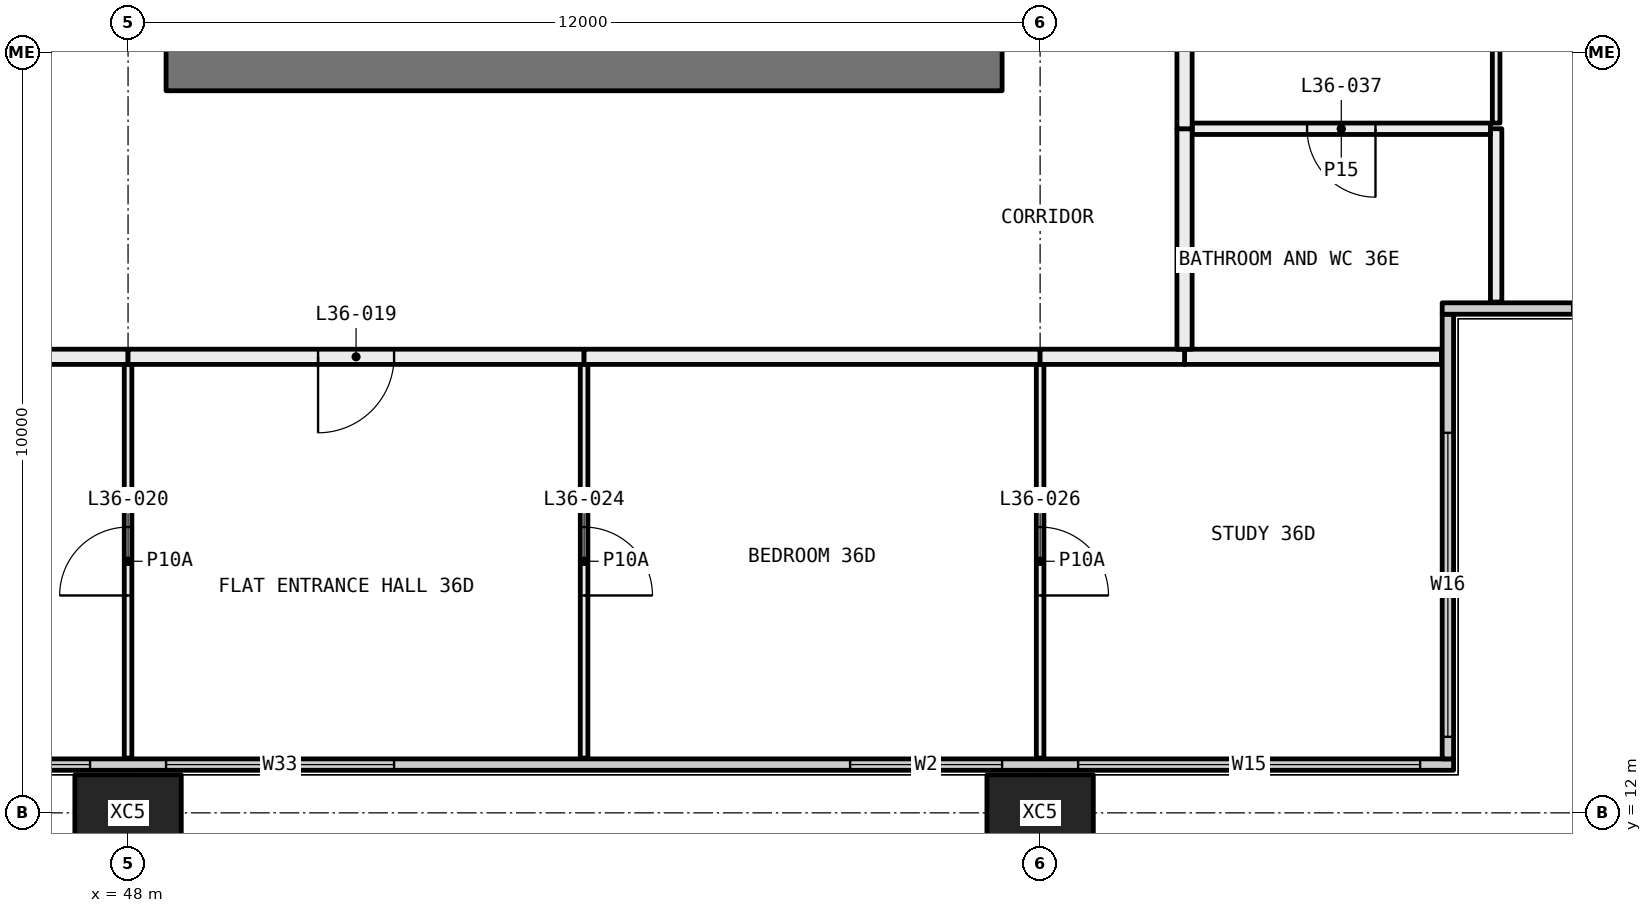
"""IFC4 building model, lengths in metres.
Left out: names, types, materials, properties, quantities, classifications, styles, units other than length and angle.
Written with IfcOpenShell. Run it as: python <this file> out.ifc"""

import sys

from ifc_helpers import new_model, si_unit, direction, frame, frame_2d, origin, origin_2d, place, context, subcontext, project, spatial, rectangle, hollow_rectangle, extrude, element, fill, save


model = new_model("IFC4")
c1 = context("Model", 3, precision=1e-05, world=origin(), true_north=direction((0.0, 1.0)))
c2 = subcontext(c1, "Body", "Model", "MODEL_VIEW")
j1 = project(units=[si_unit("LENGTHUNIT", "METRE"), si_unit("PLANEANGLEUNIT", "RADIAN")], contexts=[c1])
p1 = place(None, origin())
s1 = spatial("IfcSite", under=j1, at=p1, CompositionType="ELEMENT")
p2 = place(p1, origin())
s2 = spatial("IfcBuilding", under=s1, at=p2, CompositionType="ELEMENT")
p3 = place(p2, frame((0.0, 0.0, 138.0)))
s3 = spatial("IfcBuildingStorey", under=s2, at=p3, CompositionType="ELEMENT", Elevation=138.0)
for number, where, z_axis, x_axis in (
    (1, (48.0, 12.0, -0.4), (0.0, 0.0, 1.0), (1.0, 0.0, 0.0)),
    (2, (60.0, 12.0, -0.4), (0.0, 0.0, 1.0), (1.0, 0.0, 0.0)),
):
    element("IfcColumn", number, at=place(p3, frame(where, z_axis=z_axis, x_axis=x_axis)), inside=s3, PredefinedType="COLUMN", context=c2, shape_type="SweptSolid", body=[
        extrude(hollow_rectangle(XDim=1.4, YDim=1.0, WallThickness=0.055, at=origin_2d()), origin(), (0.0, 0.0, 1.0), 3.45),
    ])
p4 = place(p3, frame((6.56, 12.635, 0.0), z_axis=(0.0, 0.0, 1.0), x_axis=(1.0, 0.0, 0.0)))
e3 = element("IfcWall", 3, at=p4, inside=s3, PredefinedType="ELEMENTEDWALL", context=c2, shape_type="SweptSolid", body=[
    extrude(rectangle(XDim=58.88, YDim=0.15, at=frame_2d((29.44, 0.0))), origin(), (0.0, 0.0, 1.0), 3.05),
])
p5 = place(p4, frame((0.44, 0.0, 0.45)))
e4 = element("IfcOpeningElement", 4, at=p5, cuts=e3, PredefinedType="OPENING", context=c2, shape_type="SweptSolid", body=[
    extrude(rectangle(XDim=4.5, YDim=2.55, at=frame_2d((2.25, 1.275))), frame((0.0, 0.085, 0.0), z_axis=(0.0, -1.0, 0.0), x_axis=(1.0, 0.0, 0.0)), (0.0, 0.0, 1.0), 0.17),
])
p6 = place(p4, frame((5.94, 0.0, 0.45)))
e5 = element("IfcOpeningElement", 5, at=p6, cuts=e3, PredefinedType="OPENING", context=c2, shape_type="SweptSolid", body=[
    extrude(rectangle(XDim=3.0, YDim=2.55, at=frame_2d((1.5, 1.275))), frame((0.0, 0.085, 0.0), z_axis=(0.0, -1.0, 0.0), x_axis=(1.0, 0.0, 0.0)), (0.0, 0.0, 1.0), 0.17),
])
p7 = place(p4, frame((13.94, 0.0, 0.45)))
e6 = element("IfcOpeningElement", 6, at=p7, cuts=e3, PredefinedType="OPENING", context=c2, shape_type="SweptSolid", body=[
    extrude(rectangle(XDim=3.0, YDim=2.55, at=frame_2d((1.5, 1.275))), frame((0.0, 0.085, 0.0), z_axis=(0.0, -1.0, 0.0), x_axis=(1.0, 0.0, 0.0)), (0.0, 0.0, 1.0), 0.17),
])
p8 = place(p4, frame((17.94, 0.0, 0.45)))
e7 = element("IfcOpeningElement", 7, at=p8, cuts=e3, PredefinedType="OPENING", context=c2, shape_type="SweptSolid", body=[
    extrude(rectangle(XDim=3.0, YDim=2.55, at=frame_2d((1.5, 1.275))), frame((0.0, 0.085, 0.0), z_axis=(0.0, -1.0, 0.0), x_axis=(1.0, 0.0, 0.0)), (0.0, 0.0, 1.0), 0.17),
])
p9 = place(p4, frame((26.94, 0.0, 0.45)))
e8 = element("IfcOpeningElement", 8, at=p9, cuts=e3, PredefinedType="OPENING", context=c2, shape_type="SweptSolid", body=[
    extrude(rectangle(XDim=2.0, YDim=2.55, at=frame_2d((1.0, 1.275))), frame((0.0, 0.085, 0.0), z_axis=(0.0, -1.0, 0.0), x_axis=(1.0, 0.0, 0.0)), (0.0, 0.0, 1.0), 0.17),
])
p10 = place(p4, frame((29.94, 0.0, 0.45)))
e9 = element("IfcOpeningElement", 9, at=p10, cuts=e3, PredefinedType="OPENING", context=c2, shape_type="SweptSolid", body=[
    extrude(rectangle(XDim=3.0, YDim=2.55, at=frame_2d((1.5, 1.275))), frame((0.0, 0.085, 0.0), z_axis=(0.0, -1.0, 0.0), x_axis=(1.0, 0.0, 0.0)), (0.0, 0.0, 1.0), 0.17),
])
p11 = place(p4, frame((37.94, 0.0, 0.45)))
e10 = element("IfcOpeningElement", 10, at=p11, cuts=e3, PredefinedType="OPENING", context=c2, shape_type="SweptSolid", body=[
    extrude(rectangle(XDim=3.0, YDim=2.55, at=frame_2d((1.5, 1.275))), frame((0.0, 0.085, 0.0), z_axis=(0.0, -1.0, 0.0), x_axis=(1.0, 0.0, 0.0)), (0.0, 0.0, 1.0), 0.17),
])
p12 = place(p4, frame((41.94, 0.0, 0.45)))
e11 = element("IfcOpeningElement", 11, at=p12, cuts=e3, PredefinedType="OPENING", context=c2, shape_type="SweptSolid", body=[
    extrude(rectangle(XDim=3.0, YDim=2.55, at=frame_2d((1.5, 1.275))), frame((0.0, 0.085, 0.0), z_axis=(0.0, -1.0, 0.0), x_axis=(1.0, 0.0, 0.0)), (0.0, 0.0, 1.0), 0.17),
])
p13 = place(p4, frame((50.94, 0.0, 0.45)))
e12 = element("IfcOpeningElement", 12, at=p13, cuts=e3, PredefinedType="OPENING", context=c2, shape_type="SweptSolid", body=[
    extrude(rectangle(XDim=2.0, YDim=2.55, at=frame_2d((1.0, 1.275))), frame((0.0, 0.085, 0.0), z_axis=(0.0, -1.0, 0.0), x_axis=(1.0, 0.0, 0.0)), (0.0, 0.0, 1.0), 0.17),
])
p14 = place(p4, frame((53.94, 0.0, 0.45)))
e13 = element("IfcOpeningElement", 13, at=p14, cuts=e3, PredefinedType="OPENING", context=c2, shape_type="SweptSolid", body=[
    extrude(rectangle(XDim=4.5, YDim=2.55, at=frame_2d((2.25, 1.275))), frame((0.0, 0.085, 0.0), z_axis=(0.0, -1.0, 0.0), x_axis=(1.0, 0.0, 0.0)), (0.0, 0.0, 1.0), 0.17),
])
p15 = place(p3, frame((65.365, 12.71, 0.0), z_axis=(0.0, 0.0, 1.0), x_axis=(0.0, 1.0, 0.0)))
e14 = element("IfcWall", 14, at=p15, inside=s3, PredefinedType="ELEMENTEDWALL", context=c2, shape_type="SweptSolid", body=[
    extrude(rectangle(XDim=5.85, YDim=0.15, at=frame_2d((2.925, 0.0))), origin(), (0.0, 0.0, 1.0), 3.05),
])
p16 = place(p15, frame((0.29, 0.0, 0.45)))
e15 = element("IfcOpeningElement", 15, at=p16, cuts=e14, PredefinedType="OPENING", context=c2, shape_type="SweptSolid", body=[
    extrude(rectangle(XDim=4.0, YDim=2.55, at=frame_2d((2.0, 1.275))), frame((0.0, 0.085, 0.0), z_axis=(0.0, -1.0, 0.0), x_axis=(1.0, 0.0, 0.0)), (0.0, 0.0, 1.0), 0.17),
])
p17 = place(p3, frame((65.29, 18.635, 0.0), z_axis=(0.0, 0.0, 1.0), x_axis=(1.0, 0.0, 0.0)))
e16 = element("IfcWall", 16, at=p17, inside=s3, PredefinedType="ELEMENTEDWALL", context=c2, shape_type="SweptSolid", body=[
    extrude(rectangle(XDim=6.15, YDim=0.15, at=frame_2d((3.075, 0.0))), origin(), (0.0, 0.0, 1.0), 3.05),
])
p18 = place(p17, frame((1.71, 0.0, 0.45)))
e17 = element("IfcOpeningElement", 17, at=p18, cuts=e16, PredefinedType="OPENING", context=c2, shape_type="SweptSolid", body=[
    extrude(rectangle(XDim=4.0, YDim=2.55, at=frame_2d((2.0, 1.275))), frame((0.0, 0.085, 0.0), z_axis=(0.0, -1.0, 0.0), x_axis=(1.0, 0.0, 0.0)), (0.0, 0.0, 1.0), 0.17),
])
p19 = place(p3, frame((48.0, 12.72, 0.0), z_axis=(0.0, 0.0, 1.0), x_axis=(0.0, 1.0, 0.0)))
e18 = element("IfcWall", 18, at=p19, inside=s3, PredefinedType="PARTITIONING", context=c2, shape_type="SweptSolid", body=[
    extrude(rectangle(XDim=5.18, YDim=0.1, at=frame_2d((2.59, 0.0))), origin(), (0.0, 0.0, 1.0), 3.05),
])
p20 = place(p19, frame((2.14, 0.0, 0.0)))
e19 = element("IfcOpeningElement", 19, at=p20, cuts=e18, PredefinedType="OPENING", context=c2, shape_type="SweptSolid", body=[
    extrude(rectangle(XDim=0.9, YDim=2.1, at=frame_2d((0.45, 1.05))), frame((0.0, 0.06, 0.0), z_axis=(0.0, -1.0, 0.0), x_axis=(1.0, 0.0, 0.0)), (0.0, 0.0, 1.0), 0.12),
])
p21 = place(p3, frame((48.0, 18.0, 0.0), z_axis=(0.0, 0.0, 1.0), x_axis=(-1.0, 0.0, 0.0)))
e20 = element("IfcWall", 20, at=p21, inside=s3, PredefinedType="PARTITIONING", context=c2, shape_type="SweptSolid", body=[
    extrude(rectangle(XDim=1.9, YDim=0.2, at=frame_2d((0.95, 0.0))), origin(), (0.0, 0.0, 1.0), 3.05),
])
p22 = place(p3, frame((54.0, 12.72, 0.0), z_axis=(0.0, 0.0, 1.0), x_axis=(0.0, 1.0, 0.0)))
e21 = element("IfcWall", 21, at=p22, inside=s3, PredefinedType="PARTITIONING", context=c2, shape_type="SweptSolid", body=[
    extrude(rectangle(XDim=5.18, YDim=0.1, at=frame_2d((2.59, 0.0))), origin(), (0.0, 0.0, 1.0), 3.05),
])
p23 = place(p22, frame((2.14, 0.0, 0.0)))
e22 = element("IfcOpeningElement", 22, at=p23, cuts=e21, PredefinedType="OPENING", context=c2, shape_type="SweptSolid", body=[
    extrude(rectangle(XDim=0.9, YDim=2.1, at=frame_2d((0.45, 1.05))), frame((0.0, 0.06, 0.0), z_axis=(0.0, -1.0, 0.0), x_axis=(1.0, 0.0, 0.0)), (0.0, 0.0, 1.0), 0.12),
])
p24 = place(p3, frame((54.0, 18.0, 0.0), z_axis=(0.0, 0.0, 1.0), x_axis=(-1.0, 0.0, 0.0)))
e23 = element("IfcWall", 23, at=p24, inside=s3, PredefinedType="PARTITIONING", context=c2, shape_type="SweptSolid", body=[
    extrude(rectangle(XDim=6.0, YDim=0.2, at=frame_2d((3.0, 0.0))), origin(), (0.0, 0.0, 1.0), 3.05),
])
p25 = place(p24, frame((2.5, 0.0, 0.0)))
e24 = element("IfcOpeningElement", 24, at=p25, cuts=e23, PredefinedType="OPENING", context=c2, shape_type="SweptSolid", body=[
    extrude(rectangle(XDim=1.0, YDim=2.1, at=frame_2d((0.5, 1.05))), frame((0.0, 0.11, 0.0), z_axis=(0.0, -1.0, 0.0), x_axis=(1.0, 0.0, 0.0)), (0.0, 0.0, 1.0), 0.22),
])
p26 = place(p3, frame((60.0, 12.72, 0.0), z_axis=(0.0, 0.0, 1.0), x_axis=(0.0, 1.0, 0.0)))
e25 = element("IfcWall", 25, at=p26, inside=s3, PredefinedType="PARTITIONING", context=c2, shape_type="SweptSolid", body=[
    extrude(rectangle(XDim=5.18, YDim=0.1, at=frame_2d((2.59, 0.0))), origin(), (0.0, 0.0, 1.0), 3.05),
])
p27 = place(p26, frame((2.14, 0.0, 0.0)))
e26 = element("IfcOpeningElement", 26, at=p27, cuts=e25, PredefinedType="OPENING", context=c2, shape_type="SweptSolid", body=[
    extrude(rectangle(XDim=0.9, YDim=2.1, at=frame_2d((0.45, 1.05))), frame((0.0, 0.06, 0.0), z_axis=(0.0, -1.0, 0.0), x_axis=(1.0, 0.0, 0.0)), (0.0, 0.0, 1.0), 0.12),
])
p28 = place(p3, frame((60.0, 18.0, 0.0), z_axis=(0.0, 0.0, 1.0), x_axis=(-1.0, 0.0, 0.0)))
e27 = element("IfcWall", 27, at=p28, inside=s3, PredefinedType="PARTITIONING", context=c2, shape_type="SweptSolid", body=[
    extrude(rectangle(XDim=6.0, YDim=0.2, at=frame_2d((3.0, 0.0))), origin(), (0.0, 0.0, 1.0), 3.05),
])
p29 = place(p3, frame((65.28, 18.0, 0.0), z_axis=(0.0, 0.0, 1.0), x_axis=(-1.0, 0.0, 0.0)))
e28 = element("IfcWall", 28, at=p29, inside=s3, PredefinedType="PARTITIONING", context=c2, shape_type="SweptSolid", body=[
    extrude(rectangle(XDim=3.38, YDim=0.2, at=frame_2d((1.69, 0.0))), origin(), (0.0, 0.0, 1.0), 3.05),
])
p30 = place(p3, frame((61.9, 18.0, 0.0), z_axis=(0.0, 0.0, 1.0), x_axis=(-1.0, 0.0, 0.0)))
e29 = element("IfcWall", 29, at=p30, inside=s3, PredefinedType="PARTITIONING", context=c2, shape_type="SweptSolid", body=[
    extrude(rectangle(XDim=1.9, YDim=0.2, at=frame_2d((0.95, 0.0))), origin(), (0.0, 0.0, 1.0), 3.05),
])
p31 = place(p3, frame((66.0, 21.0, 0.0), z_axis=(0.0, 0.0, 1.0), x_axis=(0.0, -1.0, 0.0)))
e30 = element("IfcWall", 30, at=p31, inside=s3, PredefinedType="PARTITIONING", context=c2, shape_type="SweptSolid", body=[
    extrude(rectangle(XDim=2.28, YDim=0.15, at=frame_2d((1.14, 0.0))), origin(), (0.0, 0.0, 1.0), 3.05),
])
p32 = place(p3, frame((66.0, 23.95, 0.0), z_axis=(0.0, 0.0, 1.0), x_axis=(0.0, -1.0, 0.0)))
e31 = element("IfcWall", 31, at=p32, inside=s3, PredefinedType="PARTITIONING", context=c2, shape_type="SweptSolid", body=[
    extrude(rectangle(XDim=2.875, YDim=0.1, at=frame_2d((1.438, 0.0))), origin(), (0.0, 0.0, 1.0), 2.45),
])
p33 = place(p32, frame((0.988, 0.0, 0.0)))
e32 = element("IfcOpeningElement", 32, at=p33, cuts=e31, PredefinedType="OPENING", context=c2, shape_type="SweptSolid", body=[
    extrude(rectangle(XDim=0.9, YDim=2.1, at=frame_2d((0.45, 1.05))), frame((0.0, 0.06, 0.0), z_axis=(0.0, -1.0, 0.0), x_axis=(1.0, 0.0, 0.0)), (0.0, 0.0, 1.0), 0.12),
])
p34 = place(p3, frame((65.925, 21.0, 0.0), z_axis=(0.0, 0.0, 1.0), x_axis=(-1.0, 0.0, 0.0)))
e33 = element("IfcWall", 33, at=p34, inside=s3, PredefinedType="PARTITIONING", context=c2, shape_type="SweptSolid", body=[
    extrude(rectangle(XDim=3.925, YDim=0.15, at=frame_2d((1.962, 0.0))), origin(), (0.0, 0.0, 1.0), 3.05),
])
p35 = place(p34, frame((1.512, 0.0, 0.0)))
e34 = element("IfcOpeningElement", 34, at=p35, cuts=e33, PredefinedType="OPENING", context=c2, shape_type="SweptSolid", body=[
    extrude(rectangle(XDim=0.9, YDim=2.1, at=frame_2d((0.45, 1.05))), frame((0.0, 0.085, 0.0), z_axis=(0.0, -1.0, 0.0), x_axis=(1.0, 0.0, 0.0)), (0.0, 0.0, 1.0), 0.17),
])
for number, where, z_axis, x_axis in (
    (35, (61.9, 21.0, 0.0), (0.0, 0.0, 1.0), (0.0, -1.0, 0.0)),
    (36, (61.9, 23.9, 0.0), (0.0, 0.0, 1.0), (0.0, -1.0, 0.0)),
):
    element("IfcWall", number, at=place(p3, frame(where, z_axis=z_axis, x_axis=x_axis)), inside=s3, PredefinedType="PARTITIONING", context=c2, shape_type="SweptSolid", body=[
        extrude(rectangle(XDim=2.9, YDim=0.2, at=frame_2d((1.45, 0.0))), origin(), (0.0, 0.0, 1.0), 3.05),
    ])
p36 = place(p3, frame((59.5, 21.825, 0.0), z_axis=(0.0, 0.0, 1.0), x_axis=(-1.0, 0.0, 0.0)))
e37 = element("IfcWall", 37, at=p36, inside=s3, PredefinedType="SHEAR", context=c2, shape_type="SweptSolid", body=[
    extrude(rectangle(XDim=11.0, YDim=0.65, at=frame_2d((5.5, 0.0))), origin(), (0.0, 0.0, 1.0), 3.05),
])
p37 = place(p11, origin())
e38 = element("IfcWindow", 38, at=p37, inside=s3, PartitioningType="SINGLE_PANEL", PredefinedType="WINDOW", context=c2, shape_type="SweptSolid", body=[
    extrude(rectangle(XDim=3.0, YDim=2.55, at=frame_2d((1.5, 1.275))), frame((0.0, 0.03, 0.0), z_axis=(0.0, -1.0, 0.0), x_axis=(1.0, 0.0, 0.0)), (0.0, 0.0, 1.0), 0.06),
])
fill(e10, e38)
p38 = place(p12, origin())
e39 = element("IfcWindow", 39, at=p38, inside=s3, PartitioningType="SINGLE_PANEL", PredefinedType="WINDOW", context=c2, shape_type="SweptSolid", body=[
    extrude(rectangle(XDim=3.0, YDim=2.55, at=frame_2d((1.5, 1.275))), frame((0.0, 0.03, 0.0), z_axis=(0.0, -1.0, 0.0), x_axis=(1.0, 0.0, 0.0)), (0.0, 0.0, 1.0), 0.06),
])
fill(e11, e39)
p39 = place(p13, origin())
e40 = element("IfcWindow", 40, at=p39, inside=s3, PartitioningType="SINGLE_PANEL", PredefinedType="WINDOW", context=c2, shape_type="SweptSolid", body=[
    extrude(rectangle(XDim=2.0, YDim=2.55, at=frame_2d((1.0, 1.275))), frame((0.0, 0.03, 0.0), z_axis=(0.0, -1.0, 0.0), x_axis=(1.0, 0.0, 0.0)), (0.0, 0.0, 1.0), 0.06),
])
fill(e12, e40)
p40 = place(p14, origin())
e41 = element("IfcWindow", 41, at=p40, inside=s3, PartitioningType="SINGLE_PANEL", PredefinedType="WINDOW", context=c2, shape_type="SweptSolid", body=[
    extrude(rectangle(XDim=4.5, YDim=2.55, at=frame_2d((2.25, 1.275))), frame((0.0, 0.03, 0.0), z_axis=(0.0, -1.0, 0.0), x_axis=(1.0, 0.0, 0.0)), (0.0, 0.0, 1.0), 0.06),
])
fill(e13, e41)
p41 = place(p16, origin())
e42 = element("IfcWindow", 42, at=p41, inside=s3, PartitioningType="SINGLE_PANEL", PredefinedType="WINDOW", context=c2, shape_type="SweptSolid", body=[
    extrude(rectangle(XDim=4.0, YDim=2.55, at=frame_2d((2.0, 1.275))), frame((0.0, 0.03, 0.0), z_axis=(0.0, -1.0, 0.0), x_axis=(1.0, 0.0, 0.0)), (0.0, 0.0, 1.0), 0.06),
])
fill(e15, e42)
p42 = place(p25, origin())
e43 = element("IfcDoor", 43, at=p42, inside=s3, OperationType="SINGLE_SWING_LEFT", PredefinedType="DOOR", context=c2, shape_type="SweptSolid", body=[
    extrude(rectangle(XDim=1.0, YDim=2.1, at=frame_2d((0.5, 1.05))), frame((0.0, 0.025, 0.0), z_axis=(0.0, -1.0, 0.0), x_axis=(1.0, 0.0, 0.0)), (0.0, 0.0, 1.0), 0.05),
])
fill(e24, e43)
p43 = place(p20, origin())
e44 = element("IfcDoor", 44, at=p43, inside=s3, OperationType="SINGLE_SWING_RIGHT", PredefinedType="DOOR", context=c2, shape_type="SweptSolid", body=[
    extrude(rectangle(XDim=0.9, YDim=2.1, at=frame_2d((0.45, 1.05))), frame((0.0, 0.025, 0.0), z_axis=(0.0, -1.0, 0.0), x_axis=(1.0, 0.0, 0.0)), (0.0, 0.0, 1.0), 0.05),
])
fill(e19, e44)
p44 = place(p23, frame((0.9, 0.0, 0.0), x_axis=(-1.0, 0.0, 0.0)))
e45 = element("IfcDoor", 45, at=p44, inside=s3, OperationType="SINGLE_SWING_LEFT", PredefinedType="DOOR", context=c2, shape_type="SweptSolid", body=[
    extrude(rectangle(XDim=0.9, YDim=2.1, at=frame_2d((0.45, 1.05))), frame((0.0, 0.025, 0.0), z_axis=(0.0, -1.0, 0.0), x_axis=(1.0, 0.0, 0.0)), (0.0, 0.0, 1.0), 0.05),
])
fill(e22, e45)
p45 = place(p27, frame((0.9, 0.0, 0.0), x_axis=(-1.0, 0.0, 0.0)))
e46 = element("IfcDoor", 46, at=p45, inside=s3, OperationType="SINGLE_SWING_LEFT", PredefinedType="DOOR", context=c2, shape_type="SweptSolid", body=[
    extrude(rectangle(XDim=0.9, YDim=2.1, at=frame_2d((0.45, 1.05))), frame((0.0, 0.025, 0.0), z_axis=(0.0, -1.0, 0.0), x_axis=(1.0, 0.0, 0.0)), (0.0, 0.0, 1.0), 0.05),
])
fill(e26, e46)
p46 = place(p35, origin())
e47 = element("IfcDoor", 47, at=p46, inside=s3, OperationType="SINGLE_SWING_RIGHT", PredefinedType="DOOR", context=c2, shape_type="SweptSolid", body=[
    extrude(rectangle(XDim=0.9, YDim=2.1, at=frame_2d((0.45, 1.05))), frame((0.0, 0.025, 0.0), z_axis=(0.0, -1.0, 0.0), x_axis=(1.0, 0.0, 0.0)), (0.0, 0.0, 1.0), 0.05),
])
fill(e34, e47)
save(model, sys.argv[1])
